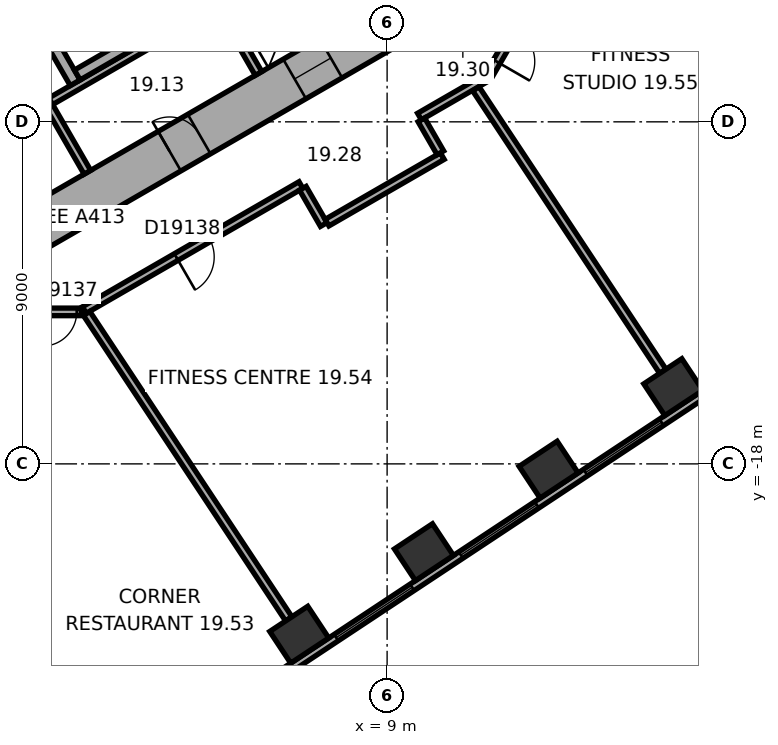
"""IFC4 building model, lengths in metres.
Left out: names, types, materials, properties, quantities, classifications, styles, units other than length and angle.
Written with IfcOpenShell. Run it as: python <this file> out.ifc"""

import sys

from ifc_helpers import new_model, si_unit, direction, frame, frame_2d, origin, origin_2d, place, context, subcontext, project, spatial, rectangle, extrude, element, fill, save


model = new_model("IFC4")
c1 = context("Model", 3, precision=1e-05, world=origin(), true_north=direction((0.0, 1.0)))
c2 = subcontext(c1, "Body", "Model", "MODEL_VIEW")
j1 = project(units=[si_unit("LENGTHUNIT", "METRE"), si_unit("PLANEANGLEUNIT", "RADIAN")], contexts=[c1])
p1 = place(None, origin())
s1 = spatial("IfcSite", under=j1, at=p1, CompositionType="ELEMENT")
p2 = place(p1, origin())
s2 = spatial("IfcBuilding", under=s1, at=p2, CompositionType="ELEMENT")
p3 = place(p2, frame((0.0, 0.0, 86.9)))
s3 = spatial("IfcBuildingStorey", under=s2, at=p3, CompositionType="ELEMENT", Elevation=86.9)
for number, where, z_axis, x_axis in (
    (1, (6.688, -22.496, 0.0), (0.0, 0.0, 1.0), (0.834, 0.552, 0.0)),
    (2, (9.969, -20.324, 0.0), (0.0, 0.0, 1.0), (0.834, 0.552, 0.0)),
    (3, (13.25, -18.152, 0.0), (0.0, 0.0, 1.0), (0.834, 0.552, 0.0)),
    (4, (16.531, -15.981, 0.0), (0.0, 0.0, 1.0), (0.834, 0.552, 0.0)),
):
    element("IfcColumn", number, at=place(p3, frame(where, z_axis=z_axis, x_axis=x_axis)), inside=s3, PredefinedType="COLUMN", context=c2, shape_type="SweptSolid", body=[
        extrude(rectangle(XDim=1.2, YDim=1.0, at=origin_2d()), origin(), (0.0, 0.0, 1.0), 3.3),
    ])
p4 = place(p3, frame((-10.4, -5.658, 0.0), z_axis=(0.0, 0.0, 1.0), x_axis=(0.866021384402, -0.500006961711, 0.0)))
e5 = element("IfcWall", 5, at=p4, inside=s3, PredefinedType="SHEAR", context=c2, shape_type="SweptSolid", body=[
    extrude(rectangle(XDim=12.355, YDim=1.2, at=frame_2d((6.178, 0.0))), origin(), (0.0, 0.0, 1.0), 3.3),
])
p5 = place(p4, frame((6.378, 0.0, 0.0)))
e6 = element("IfcOpeningElement", 6, at=p5, cuts=e5, PredefinedType="OPENING", context=c2, shape_type="SweptSolid", body=[
    extrude(rectangle(XDim=1.5, YDim=2.1, at=frame_2d((0.75, 1.05))), frame((0.0, 0.61, 0.0), z_axis=(0.0, -1.0, 0.0), x_axis=(1.0, 0.0, 0.0)), (0.0, 0.0, 1.0), 1.22),
])
p6 = place(p4, frame((3.228, 0.0, 0.0)))
e7 = element("IfcOpeningElement", 7, at=p6, cuts=e5, PredefinedType="OPENING", context=c2, shape_type="SweptSolid", body=[
    extrude(rectangle(XDim=0.9, YDim=2.1, at=frame_2d((0.45, 1.05))), frame((0.0, 0.61, 0.0), z_axis=(0.0, -1.0, 0.0), x_axis=(1.0, 0.0, 0.0)), (0.0, 0.0, 1.0), 1.22),
])
p7 = place(p3, frame((-0.3, -11.836, 0.0), z_axis=(0.0, 0.0, 1.0), x_axis=(0.866021384402, 0.500006961711, 0.0)))
e8 = element("IfcWall", 8, at=p7, inside=s3, PredefinedType="SHEAR", context=c2, shape_type="SweptSolid", body=[
    extrude(rectangle(XDim=12.355, YDim=1.2, at=frame_2d((6.178, 0.0))), origin(), (0.0, 0.0, 1.0), 3.3),
])
p8 = place(p7, frame((4.128, 0.0, 0.0)))
e9 = element("IfcOpeningElement", 9, at=p8, cuts=e8, PredefinedType="OPENING", context=c2, shape_type="SweptSolid", body=[
    extrude(rectangle(XDim=0.9, YDim=2.1, at=frame_2d((0.45, 1.05))), frame((0.0, 0.61, 0.0), z_axis=(0.0, -1.0, 0.0), x_axis=(1.0, 0.0, 0.0)), (0.0, 0.0, 1.0), 1.22),
])
p9 = place(p7, frame((7.928, 0.0, 0.0)))
e10 = element("IfcOpeningElement", 10, at=p9, cuts=e8, PredefinedType="OPENING", context=c2, shape_type="SweptSolid", body=[
    extrude(rectangle(XDim=1.1, YDim=2.1, at=frame_2d((0.55, 1.05))), frame((0.0, 0.61, 0.0), z_axis=(0.0, -1.0, 0.0), x_axis=(1.0, 0.0, 0.0)), (0.0, 0.0, 1.0), 1.22),
])
p10 = place(p3, frame((3.083, -25.601, 0.0), z_axis=(0.0, 0.0, 1.0), x_axis=(0.833884295743, 0.551939291329, 0.0)))
e11 = element("IfcWall", 11, at=p10, inside=s3, PredefinedType="STANDARD", context=c2, shape_type="SweptSolid", body=[
    extrude(rectangle(XDim=21.246, YDim=0.2, at=frame_2d((10.623, 0.0))), origin(), (0.0, 0.0, 1.0), 3.3),
])
p11 = place(p10, frame((1.553, 0.0, 0.8)))
e12 = element("IfcOpeningElement", 12, at=p11, cuts=e11, PredefinedType="OPENING", context=c2, shape_type="SweptSolid", body=[
    extrude(rectangle(XDim=2.4, YDim=1.7, at=frame_2d((1.2, 0.85))), frame((0.0, 0.11, 0.0), z_axis=(0.0, -1.0, 0.0), x_axis=(1.0, 0.0, 0.0)), (0.0, 0.0, 1.0), 0.22),
])
p12 = place(p10, frame((5.488, 0.0, 0.8)))
e13 = element("IfcOpeningElement", 13, at=p12, cuts=e11, PredefinedType="OPENING", context=c2, shape_type="SweptSolid", body=[
    extrude(rectangle(XDim=2.4, YDim=1.7, at=frame_2d((1.2, 0.85))), frame((0.0, 0.11, 0.0), z_axis=(0.0, -1.0, 0.0), x_axis=(1.0, 0.0, 0.0)), (0.0, 0.0, 1.0), 0.22),
])
p13 = place(p10, frame((9.422, 0.0, 0.8)))
e14 = element("IfcOpeningElement", 14, at=p13, cuts=e11, PredefinedType="OPENING", context=c2, shape_type="SweptSolid", body=[
    extrude(rectangle(XDim=2.4, YDim=1.7, at=frame_2d((1.2, 0.85))), frame((0.0, 0.11, 0.0), z_axis=(0.0, -1.0, 0.0), x_axis=(1.0, 0.0, 0.0)), (0.0, 0.0, 1.0), 0.22),
])
p14 = place(p10, frame((13.357, 0.0, 0.8)))
e15 = element("IfcOpeningElement", 15, at=p14, cuts=e11, PredefinedType="OPENING", context=c2, shape_type="SweptSolid", body=[
    extrude(rectangle(XDim=2.4, YDim=1.7, at=frame_2d((1.2, 0.85))), frame((0.0, 0.11, 0.0), z_axis=(0.0, -1.0, 0.0), x_axis=(1.0, 0.0, 0.0)), (0.0, 0.0, 1.0), 0.22),
])
p15 = place(p10, frame((17.291, 0.0, 0.8)))
e16 = element("IfcOpeningElement", 16, at=p15, cuts=e11, PredefinedType="OPENING", context=c2, shape_type="SweptSolid", body=[
    extrude(rectangle(XDim=2.4, YDim=1.7, at=frame_2d((1.2, 0.85))), frame((0.0, 0.11, 0.0), z_axis=(0.0, -1.0, 0.0), x_axis=(1.0, 0.0, 0.0)), (0.0, 0.0, 1.0), 0.22),
])
p16 = place(p3, frame((-0.024, -8.559, 0.0), z_axis=(0.0, 0.0, 1.0), x_axis=(0.866026010844, 0.49999894854, 0.0)))
e17 = element("IfcWall", 17, at=p16, inside=s3, PredefinedType="PARTITIONING", context=c2, shape_type="SweptSolid", body=[
    extrude(rectangle(XDim=8.0, YDim=0.2, at=frame_2d((4.0, 0.0))), origin(), (0.0, 0.0, 1.0), 3.05),
])
for number, where, z_axis, x_axis in (
    (18, (0.013, -8.422, 0.0), (0.0, 0.0, 1.0), (0.5, -0.866, 0.0)),
    (19, (4.516, -5.822, 0.0), (0.0, 0.0, 1.0), (0.5, -0.866, 0.0)),
):
    element("IfcWall", number, at=place(p3, frame(where, z_axis=z_axis, x_axis=x_axis)), inside=s3, PredefinedType="PARTITIONING", context=c2, shape_type="SweptSolid", body=[
        extrude(rectangle(XDim=2.2, YDim=0.2, at=frame_2d((1.1, 0.0))), origin(), (0.0, 0.0, 1.0), 3.05),
    ])
p17 = place(p3, frame((-1.558, -3.902, 0.0), z_axis=(0.0, 0.0, 1.0), x_axis=(0.499977259774, -0.866038532462, 0.0)))
e20 = element("IfcWall", 20, at=p17, inside=s3, PredefinedType="SHEAR", context=c2, shape_type="SweptSolid", body=[
    extrude(rectangle(XDim=4.7, YDim=0.3, at=frame_2d((2.35, 0.0))), origin(), (0.0, 0.0, 1.0), 3.05),
])
p18 = place(p17, frame((0.8, 0.0, 0.0)))
e21 = element("IfcOpeningElement", 21, at=p18, cuts=e20, PredefinedType="OPENING", context=c2, shape_type="SweptSolid", body=[
    extrude(rectangle(XDim=1.2, YDim=2.1, at=frame_2d((0.6, 1.05))), frame((0.0, 0.16, 0.0), z_axis=(0.0, -1.0, 0.0), x_axis=(1.0, 0.0, 0.0)), (0.0, 0.0, 1.0), 0.32),
])
p19 = place(p3, frame((0.847, -7.767, 0.0), z_axis=(0.0, 0.0, 1.0), x_axis=(0.866027801685, 0.499995846692, 0.0)))
e22 = element("IfcWall", 22, at=p19, inside=s3, PredefinedType="SHEAR", context=c2, shape_type="SweptSolid", body=[
    extrude(rectangle(XDim=7.06, YDim=0.3, at=frame_2d((3.53, 0.0))), origin(), (0.0, 0.0, 1.0), 3.05),
])
p20 = place(p3, frame((-0.186, -14.001, 0.0), z_axis=(0.0, 0.0, 1.0), x_axis=(1.0, 0.0, 0.0)))
e23 = element("IfcWall", 23, at=p20, inside=s3, PredefinedType="PARTITIONING", context=c2, shape_type="SweptSolid", body=[
    extrude(rectangle(XDim=1.136, YDim=0.2, at=frame_2d((0.568, 0.0))), origin(), (0.0, 0.0, 1.0), 3.05),
])
p21 = place(p20, frame((0.118, 0.0, 0.0)))
e24 = element("IfcOpeningElement", 24, at=p21, cuts=e23, PredefinedType="OPENING", context=c2, shape_type="SweptSolid", body=[
    extrude(rectangle(XDim=0.9, YDim=2.1, at=frame_2d((0.45, 1.05))), frame((0.0, 0.11, 0.0), z_axis=(0.0, -1.0, 0.0), x_axis=(1.0, 0.0, 0.0)), (0.0, 0.0, 1.0), 0.22),
])
p22 = place(p3, frame((1.033, -13.953, 0.0), z_axis=(0.0, 0.0, 1.0), x_axis=(0.866017531406, 0.500013635111, 0.0)))
e25 = element("IfcWall", 25, at=p22, inside=s3, PredefinedType="PARTITIONING", context=c2, shape_type="SweptSolid", body=[
    extrude(rectangle(XDim=6.58, YDim=0.2, at=frame_2d((3.29, 0.0))), origin(), (0.0, 0.0, 1.0), 3.05),
])
p23 = place(p22, frame((2.79, 0.0, 0.0)))
e26 = element("IfcOpeningElement", 26, at=p23, cuts=e25, PredefinedType="OPENING", context=c2, shape_type="SweptSolid", body=[
    extrude(rectangle(XDim=1.0, YDim=2.1, at=frame_2d((0.5, 1.05))), frame((0.0, 0.11, 0.0), z_axis=(0.0, -1.0, 0.0), x_axis=(1.0, 0.0, 0.0)), (0.0, 0.0, 1.0), 0.22),
])
p24 = place(p3, frame((6.412, -22.079, 0.0), z_axis=(0.0, 0.0, 1.0), x_axis=(-0.551919507115, 0.83389739037, 0.0)))
e27 = element("IfcWall", 27, at=p24, inside=s3, PredefinedType="PARTITIONING", context=c2, shape_type="SweptSolid", body=[
    extrude(rectangle(XDim=9.635, YDim=0.2, at=frame_2d((4.817, 0.0))), origin(), (0.0, 0.0, 1.0), 3.05),
])
p25 = place(p3, frame((6.782, -10.749, 0.0), z_axis=(0.0, 0.0, 1.0), x_axis=(0.500074377092, -0.865982457891, 0.0)))
e28 = element("IfcWall", 28, at=p25, inside=s3, PredefinedType="PARTITIONING", context=c2, shape_type="SweptSolid", body=[
    extrude(rectangle(XDim=1.101, YDim=0.2, at=frame_2d((0.55, 0.0))), origin(), (0.0, 0.0, 1.0), 3.05),
])
p26 = place(p3, frame((7.419, -11.653, 0.0), z_axis=(0.0, 0.0, 1.0), x_axis=(0.866038154057, 0.49997791523, 0.0)))
e29 = element("IfcWall", 29, at=p26, inside=s3, PredefinedType="PARTITIONING", context=c2, shape_type="SweptSolid", body=[
    extrude(rectangle(XDim=3.502, YDim=0.2, at=frame_2d((1.751, 0.0))), origin(), (0.0, 0.0, 1.0), 3.05),
])
p27 = place(p3, frame((9.852, -8.861, 0.0), z_axis=(0.0, 0.0, 1.0), x_axis=(0.866013291437, 0.500020978615, 0.0)))
e30 = element("IfcWall", 30, at=p27, inside=s3, PredefinedType="PARTITIONING", context=c2, shape_type="SweptSolid", body=[
    extrude(rectangle(XDim=2.077, YDim=0.2, at=frame_2d((1.038, 0.0))), origin(), (0.0, 0.0, 1.0), 3.05),
])
p28 = place(p3, frame((10.402, -9.815, 0.0), z_axis=(0.0, 0.0, 1.0), x_axis=(-0.499968756647, 0.866043441391, 0.0)))
e31 = element("IfcWall", 31, at=p28, inside=s3, PredefinedType="PARTITIONING", context=c2, shape_type="SweptSolid", body=[
    extrude(rectangle(XDim=1.001, YDim=0.2, at=frame_2d((0.5, 0.0))), origin(), (0.0, 0.0, 1.0), 3.05),
])
p29 = place(p3, frame((11.67, -7.788, 0.0), z_axis=(0.0, 0.0, 1.0), x_axis=(0.500063286585, 0.865988862174, 0.0)))
e32 = element("IfcWall", 32, at=p29, inside=s3, PredefinedType="PARTITIONING", context=c2, shape_type="SweptSolid", body=[
    extrude(rectangle(XDim=1.86, YDim=0.2, at=frame_2d((0.93, 0.0))), origin(), (0.0, 0.0, 1.0), 3.05),
])
p30 = place(p29, frame((0.43, 0.0, 0.0)))
e33 = element("IfcOpeningElement", 33, at=p30, cuts=e32, PredefinedType="OPENING", context=c2, shape_type="SweptSolid", body=[
    extrude(rectangle(XDim=1.0, YDim=2.1, at=frame_2d((0.5, 1.05))), frame((0.0, 0.11, 0.0), z_axis=(0.0, -1.0, 0.0), x_axis=(1.0, 0.0, 0.0)), (0.0, 0.0, 1.0), 0.22),
])
p31 = place(p3, frame((16.255, -15.564, 0.0), z_axis=(0.0, 0.0, 1.0), x_axis=(-0.55192208744, 0.833895682562, 0.0)))
e34 = element("IfcWall", 34, at=p31, inside=s3, PredefinedType="PARTITIONING", context=c2, shape_type="SweptSolid", body=[
    extrude(rectangle(XDim=8.913, YDim=0.2, at=frame_2d((4.457, 0.0))), origin(), (0.0, 0.0, 1.0), 2.6),
])
p32 = place(p12, origin())
e35 = element("IfcWindow", 35, at=p32, inside=s3, PartitioningType="SINGLE_PANEL", PredefinedType="WINDOW", context=c2, shape_type="SweptSolid", body=[
    extrude(rectangle(XDim=2.4, YDim=1.7, at=frame_2d((1.2, 0.85))), frame((0.0, 0.03, 0.0), z_axis=(0.0, -1.0, 0.0), x_axis=(1.0, 0.0, 0.0)), (0.0, 0.0, 1.0), 0.06),
])
fill(e13, e35)
p33 = place(p13, origin())
e36 = element("IfcWindow", 36, at=p33, inside=s3, PartitioningType="SINGLE_PANEL", PredefinedType="WINDOW", context=c2, shape_type="SweptSolid", body=[
    extrude(rectangle(XDim=2.4, YDim=1.7, at=frame_2d((1.2, 0.85))), frame((0.0, 0.03, 0.0), z_axis=(0.0, -1.0, 0.0), x_axis=(1.0, 0.0, 0.0)), (0.0, 0.0, 1.0), 0.06),
])
fill(e14, e36)
p34 = place(p14, origin())
e37 = element("IfcWindow", 37, at=p34, inside=s3, PartitioningType="SINGLE_PANEL", PredefinedType="WINDOW", context=c2, shape_type="SweptSolid", body=[
    extrude(rectangle(XDim=2.4, YDim=1.7, at=frame_2d((1.2, 0.85))), frame((0.0, 0.03, 0.0), z_axis=(0.0, -1.0, 0.0), x_axis=(1.0, 0.0, 0.0)), (0.0, 0.0, 1.0), 0.06),
])
fill(e15, e37)
p35 = place(p8, origin())
e38 = element("IfcDoor", 38, at=p35, inside=s3, OperationType="SINGLE_SWING_LEFT", PredefinedType="DOOR", context=c2, shape_type="SweptSolid", body=[
    extrude(rectangle(XDim=0.9, YDim=2.1, at=frame_2d((0.45, 1.05))), frame((0.0, 0.025, 0.0), z_axis=(0.0, -1.0, 0.0), x_axis=(1.0, 0.0, 0.0)), (0.0, 0.0, 1.0), 0.05),
])
fill(e9, e38)
p36 = place(p9, origin())
e39 = element("IfcDoor", 39, at=p36, inside=s3, OperationType="DOUBLE_DOOR_SLIDING", PredefinedType="DOOR", context=c2, shape_type="SweptSolid", body=[
    extrude(rectangle(XDim=1.1, YDim=2.1, at=frame_2d((0.55, 1.05))), frame((0.0, 0.025, 0.0), z_axis=(0.0, -1.0, 0.0), x_axis=(1.0, 0.0, 0.0)), (0.0, 0.0, 1.0), 0.05),
])
fill(e10, e39)
p37 = place(p21, origin())
e40 = element("IfcDoor", 40, at=p37, inside=s3, OperationType="SINGLE_SWING_LEFT", PredefinedType="DOOR", context=c2, shape_type="SweptSolid", body=[
    extrude(rectangle(XDim=0.9, YDim=2.1, at=frame_2d((0.45, 1.05))), frame((0.0, 0.025, 0.0), z_axis=(0.0, -1.0, 0.0), x_axis=(1.0, 0.0, 0.0)), (0.0, 0.0, 1.0), 0.05),
])
fill(e24, e40)
p38 = place(p23, origin())
e41 = element("IfcDoor", 41, at=p38, inside=s3, OperationType="SINGLE_SWING_LEFT", PredefinedType="DOOR", context=c2, shape_type="SweptSolid", body=[
    extrude(rectangle(XDim=1.0, YDim=2.1, at=frame_2d((0.5, 1.05))), frame((0.0, 0.025, 0.0), z_axis=(0.0, -1.0, 0.0), x_axis=(1.0, 0.0, 0.0)), (0.0, 0.0, 1.0), 0.05),
])
fill(e26, e41)
p39 = place(p30, origin())
e42 = element("IfcDoor", 42, at=p39, inside=s3, OperationType="SINGLE_SWING_LEFT", PredefinedType="DOOR", context=c2, shape_type="SweptSolid", body=[
    extrude(rectangle(XDim=1.0, YDim=2.1, at=frame_2d((0.5, 1.05))), frame((0.0, 0.025, 0.0), z_axis=(0.0, -1.0, 0.0), x_axis=(1.0, 0.0, 0.0)), (0.0, 0.0, 1.0), 0.05),
])
fill(e33, e42)
save(model, sys.argv[1])
